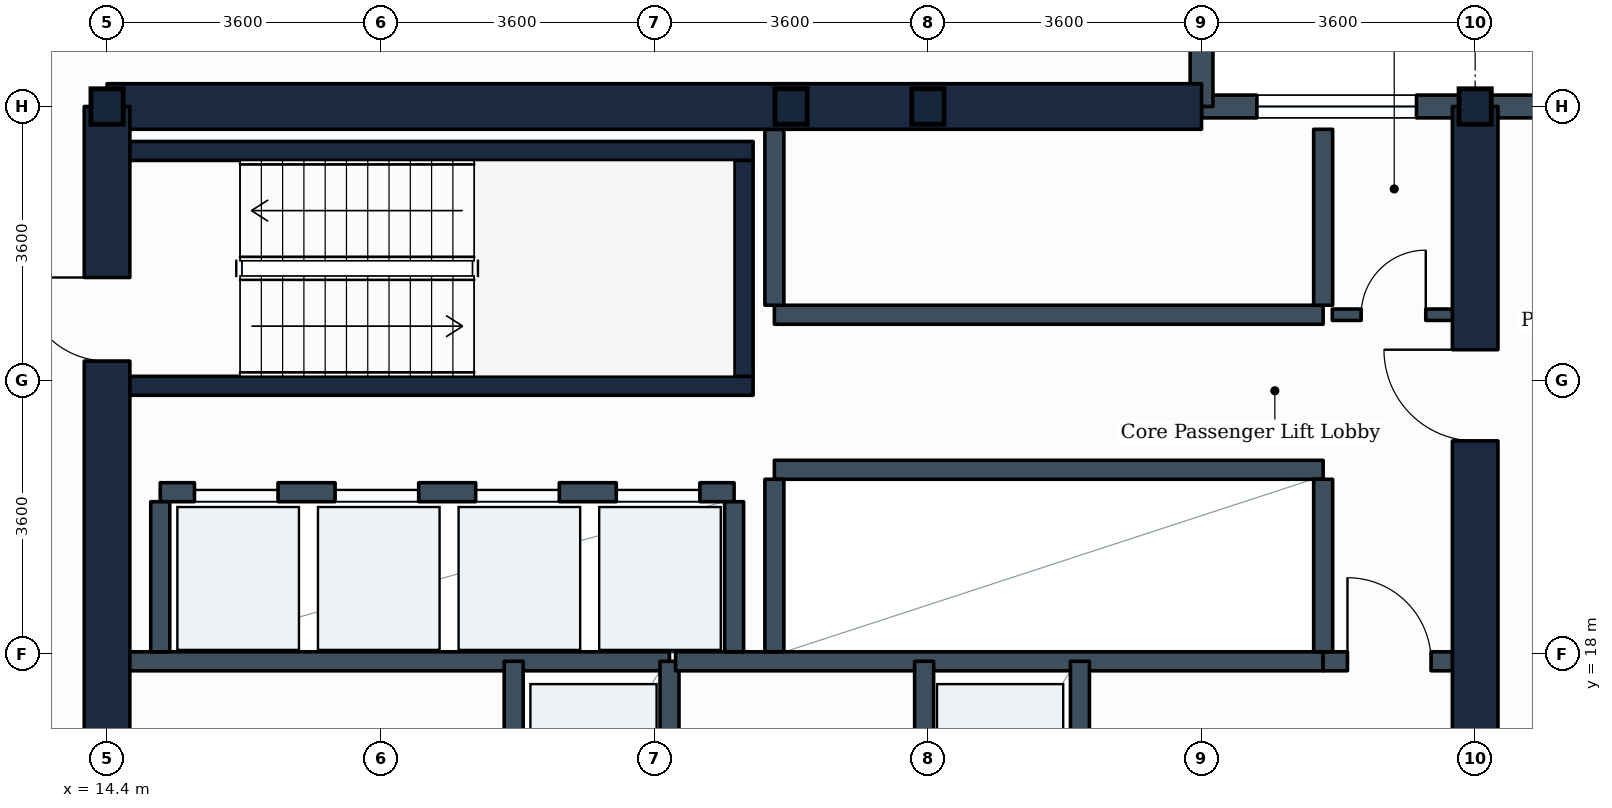
"""IFC4 building model, lengths in metres.
Left out: names, types, materials, properties, quantities, classifications, styles, units other than length and angle.
Written with IfcOpenShell. Run it as: python <this file> out.ifc"""

import sys

from ifc_helpers import new_model, si_unit, direction, frame, frame_2d, origin, origin_2d, place, context, subcontext, project, spatial, rectangle, i_section, extrude, element, fill, save


model = new_model("IFC4")
c1 = context("Model", 3, precision=1e-05, world=origin(), true_north=direction((0.0, 1.0)))
c2 = subcontext(c1, "Body", "Model", "MODEL_VIEW")
j1 = project(units=[si_unit("LENGTHUNIT", "METRE"), si_unit("PLANEANGLEUNIT", "RADIAN")], contexts=[c1])
p1 = place(None, origin())
s1 = spatial("IfcSite", under=j1, at=p1, CompositionType="ELEMENT")
p2 = place(p1, origin())
s2 = spatial("IfcBuilding", under=s1, at=p2, CompositionType="ELEMENT")
p3 = place(p2, frame((0.0, 0.0, 99.6)))
s3 = spatial("IfcBuildingStorey", under=s2, at=p3, CompositionType="ELEMENT", Elevation=99.6)
for number, where, z_axis, x_axis in (
    (1, (14.4, 25.2, 0.0), (0.0, 0.0, 1.0), (1.0, 0.0, 0.0)),
    (2, (23.4, 25.2, 0.0), (0.0, 0.0, 1.0), (1.0, 0.0, 0.0)),
    (3, (25.2, 25.2, 0.0), (0.0, 0.0, 1.0), (1.0, 0.0, 0.0)),
    (4, (32.4, 25.2, 0.0), (0.0, 0.0, 1.0), (1.0, 0.0, 0.0)),
):
    element("IfcColumn", number, at=place(p3, frame(where, z_axis=z_axis, x_axis=x_axis)), inside=s3, PredefinedType="COLUMN", context=c2, shape_type="SweptSolid", body=[
        extrude(i_section(OverallWidth=0.424, OverallDepth=0.467, WebThickness=0.033, FlangeThickness=0.053, FilletRadius=0.015, at=origin_2d()), origin(), (0.0, 0.0, 1.0), 3.9),
    ])
p4 = place(p3, frame((32.4, 25.2, 0.0), z_axis=(0.0, 0.0, 1.0), x_axis=(1.0, 0.0, 0.0)))
e5 = element("IfcWall", 5, at=p4, inside=s3, PredefinedType="STANDARD", context=c2, shape_type="SweptSolid", body=[
    extrude(rectangle(XDim=3.6, YDim=0.3, at=frame_2d((1.8, 0.0))), origin(), (0.0, 0.0, 1.0), 2.93),
])
p5 = place(p3, frame((28.8, 25.2, 0.0), z_axis=(0.0, 0.0, 1.0), x_axis=(1.0, 0.0, 0.0)))
e6 = element("IfcWall", 6, at=p5, inside=s3, PredefinedType="STANDARD", context=c2, shape_type="SweptSolid", body=[
    extrude(rectangle(XDim=3.6, YDim=0.3, at=frame_2d((1.8, 0.0))), origin(), (0.0, 0.0, 1.0), 3.635),
])
p6 = place(p5, frame((0.728, 0.0, 0.85)))
e7 = element("IfcOpeningElement", 7, at=p6, cuts=e6, PredefinedType="OPENING", context=c2, shape_type="SweptSolid", body=[
    extrude(rectangle(XDim=2.1, YDim=1.35, at=frame_2d((1.05, 0.675))), frame((0.0, 0.16, 0.0), z_axis=(0.0, -1.0, 0.0), x_axis=(1.0, 0.0, 0.0)), (0.0, 0.0, 1.0), 0.32),
])
p7 = place(p3, frame((28.8, 28.8, 0.0), z_axis=(0.0, 0.0, 1.0), x_axis=(0.0, -1.0, 0.0)))
e8 = element("IfcWall", 8, at=p7, inside=s3, PredefinedType="STANDARD", context=c2, shape_type="SweptSolid", body=[
    extrude(rectangle(XDim=3.6, YDim=0.3, at=frame_2d((1.8, 0.0))), origin(), (0.0, 0.0, 1.0), 3.19),
])
p8 = place(p3, frame((14.4, 25.2, 0.0), z_axis=(0.0, 0.0, 1.0), x_axis=(1.0, 0.0, 0.0)))
e9 = element("IfcWall", 9, at=p8, inside=s3, PredefinedType="SHEAR", context=c2, shape_type="SweptSolid", body=[
    extrude(rectangle(XDim=14.4, YDim=0.6, at=frame_2d((7.2, 0.0))), origin(), (0.0, 0.0, 1.0), 3.65),
])
p9 = place(p3, frame((14.4, 10.8, 0.0), z_axis=(0.0, 0.0, 1.0), x_axis=(0.0, 1.0, 0.0)))
e10 = element("IfcWall", 10, at=p9, inside=s3, PredefinedType="SHEAR", context=c2, shape_type="SweptSolid", body=[
    extrude(rectangle(XDim=14.4, YDim=0.6, at=frame_2d((7.2, 0.0))), origin(), (0.0, 0.0, 1.0), 3.65),
])
p10 = place(p9, frame((11.05, 0.0, 0.0)))
e11 = element("IfcOpeningElement", 11, at=p10, cuts=e10, PredefinedType="OPENING", context=c2, shape_type="SweptSolid", body=[
    extrude(rectangle(XDim=1.1, YDim=2.1, at=frame_2d((0.55, 1.05))), frame((0.0, 0.31, 0.0), z_axis=(0.0, -1.0, 0.0), x_axis=(1.0, 0.0, 0.0)), (0.0, 0.0, 1.0), 0.62),
])
p11 = place(p9, frame((4.9, 0.0, 0.0)))
e12 = element("IfcOpeningElement", 12, at=p11, cuts=e10, PredefinedType="OPENING", context=c2, shape_type="SweptSolid", body=[
    extrude(rectangle(XDim=1.2, YDim=2.1, at=frame_2d((0.6, 1.05))), frame((0.0, 0.31, 0.0), z_axis=(0.0, -1.0, 0.0), x_axis=(1.0, 0.0, 0.0)), (0.0, 0.0, 1.0), 0.62),
])
p12 = place(p3, frame((32.4, 10.8, 0.0), z_axis=(0.0, 0.0, 1.0), x_axis=(0.0, 1.0, 0.0)))
e13 = element("IfcWall", 13, at=p12, inside=s3, PredefinedType="SHEAR", context=c2, shape_type="SweptSolid", body=[
    extrude(rectangle(XDim=14.4, YDim=0.6, at=frame_2d((7.2, 0.0))), origin(), (0.0, 0.0, 1.0), 3.65),
])
p13 = place(p12, frame((4.35, 0.0, 0.0)))
e14 = element("IfcOpeningElement", 14, at=p13, cuts=e13, PredefinedType="OPENING", context=c2, shape_type="SweptSolid", body=[
    extrude(rectangle(XDim=1.2, YDim=2.1, at=frame_2d((0.6, 1.05))), frame((0.0, 0.31, 0.0), z_axis=(0.0, -1.0, 0.0), x_axis=(1.0, 0.0, 0.0)), (0.0, 0.0, 1.0), 0.62),
])
p14 = place(p12, frame((10.0, 0.0, 0.0)))
e15 = element("IfcOpeningElement", 15, at=p14, cuts=e13, PredefinedType="OPENING", context=c2, shape_type="SweptSolid", body=[
    extrude(rectangle(XDim=1.2, YDim=2.1, at=frame_2d((0.6, 1.05))), frame((0.0, 0.31, 0.0), z_axis=(0.0, -1.0, 0.0), x_axis=(1.0, 0.0, 0.0)), (0.0, 0.0, 1.0), 0.62),
])
for number, where, z_axis, x_axis in (
    (16, (14.7, 21.525, 0.0), (0.0, 0.0, 1.0), (1.0, 0.0, 0.0)),
    (17, (14.7, 24.615, 0.0), (0.0, 0.0, 1.0), (1.0, 0.0, 0.0)),
):
    element("IfcWall", number, at=place(p3, frame(where, z_axis=z_axis, x_axis=x_axis)), inside=s3, PredefinedType="SHEAR", context=c2, shape_type="SweptSolid", body=[
        extrude(rectangle(XDim=8.2, YDim=0.25, at=frame_2d((4.1, 0.0))), origin(), (0.0, 0.0, 1.0), 3.65),
    ])
p15 = place(p3, frame((22.775, 21.65, 0.0), z_axis=(0.0, 0.0, 1.0), x_axis=(0.0, 1.0, 0.0)))
e18 = element("IfcWall", 18, at=p15, inside=s3, PredefinedType="SHEAR", context=c2, shape_type="SweptSolid", body=[
    extrude(rectangle(XDim=2.84, YDim=0.25, at=frame_2d((1.42, 0.0))), origin(), (0.0, 0.0, 1.0), 3.65),
])
p16 = place(p3, frame((14.65, 17.9, 0.0), z_axis=(0.0, 0.0, 1.0), x_axis=(1.0, 0.0, 0.0)))
e19 = element("IfcWall", 19, at=p16, inside=s3, PredefinedType="PARTITIONING", context=c2, shape_type="SweptSolid", body=[
    extrude(rectangle(XDim=7.15, YDim=0.25, at=frame_2d((3.575, 0.0))), origin(), (0.0, 0.0, 1.0), 3.635),
])
p17 = place(p3, frame((19.75, 14.84, 0.0), z_axis=(0.0, 0.0, 1.0), x_axis=(0.0, 1.0, 0.0)))
e20 = element("IfcWall", 20, at=p17, inside=s3, PredefinedType="PARTITIONING", context=c2, shape_type="SweptSolid", body=[
    extrude(rectangle(XDim=3.06, YDim=0.25, at=frame_2d((1.53, 0.0))), origin(), (0.0, 0.0, 1.0), 3.635),
])
p18 = place(p17, frame((0.98, 0.0, 0.0)))
e21 = element("IfcOpeningElement", 21, at=p18, cuts=e20, PredefinedType="OPENING", context=c2, shape_type="SweptSolid", body=[
    extrude(rectangle(XDim=1.1, YDim=2.1, at=frame_2d((0.55, 1.05))), frame((0.0, 0.135, 0.0), z_axis=(0.0, -1.0, 0.0), x_axis=(1.0, 0.0, 0.0)), (0.0, 0.0, 1.0), 0.27),
])
p19 = place(p3, frame((21.8, 14.84, 0.0), z_axis=(0.0, 0.0, 1.0), x_axis=(0.0, 1.0, 0.0)))
e22 = element("IfcWall", 22, at=p19, inside=s3, PredefinedType="PARTITIONING", context=c2, shape_type="SweptSolid", body=[
    extrude(rectangle(XDim=3.06, YDim=0.25, at=frame_2d((1.53, 0.0))), origin(), (0.0, 0.0, 1.0), 3.635),
])
p20 = place(p3, frame((21.88, 17.9, 0.0), z_axis=(0.0, 0.0, 1.0), x_axis=(1.0, 0.0, 0.0)))
e23 = element("IfcWall", 23, at=p20, inside=s3, PredefinedType="PARTITIONING", context=c2, shape_type="SweptSolid", body=[
    extrude(rectangle(XDim=8.52, YDim=0.25, at=frame_2d((4.26, 0.0))), origin(), (0.0, 0.0, 1.0), 3.635),
])
p21 = place(p3, frame((30.4, 17.9, 0.0), z_axis=(0.0, 0.0, 1.0), x_axis=(1.0, 0.0, 0.0)))
e24 = element("IfcWall", 24, at=p21, inside=s3, PredefinedType="PARTITIONING", context=c2, shape_type="SweptSolid", body=[
    extrude(rectangle(XDim=1.75, YDim=0.25, at=frame_2d((0.875, 0.0))), origin(), (0.0, 0.0, 1.0), 3.635),
])
p22 = place(p21, frame((0.32, 0.0, 0.0)))
e25 = element("IfcOpeningElement", 25, at=p22, cuts=e24, PredefinedType="OPENING", context=c2, shape_type="SweptSolid", body=[
    extrude(rectangle(XDim=1.1, YDim=2.1, at=frame_2d((0.55, 1.05))), frame((0.0, 0.135, 0.0), z_axis=(0.0, -1.0, 0.0), x_axis=(1.0, 0.0, 0.0)), (0.0, 0.0, 1.0), 0.27),
])
p23 = place(p3, frame((25.15, 14.84, 0.0), z_axis=(0.0, 0.0, 1.0), x_axis=(0.0, 1.0, 0.0)))
e26 = element("IfcWall", 26, at=p23, inside=s3, PredefinedType="PARTITIONING", context=c2, shape_type="SweptSolid", body=[
    extrude(rectangle(XDim=3.06, YDim=0.25, at=frame_2d((1.53, 0.0))), origin(), (0.0, 0.0, 1.0), 3.635),
])
p24 = place(p3, frame((27.2, 14.84, 0.0), z_axis=(0.0, 0.0, 1.0), x_axis=(0.0, 1.0, 0.0)))
e27 = element("IfcWall", 27, at=p24, inside=s3, PredefinedType="PARTITIONING", context=c2, shape_type="SweptSolid", body=[
    extrude(rectangle(XDim=3.06, YDim=0.25, at=frame_2d((1.53, 0.0))), origin(), (0.0, 0.0, 1.0), 3.635),
])
p25 = place(p24, frame((0.98, 0.0, 0.0)))
e28 = element("IfcOpeningElement", 28, at=p25, cuts=e27, PredefinedType="OPENING", context=c2, shape_type="SweptSolid", body=[
    extrude(rectangle(XDim=1.1, YDim=2.1, at=frame_2d((0.55, 1.05))), frame((0.0, 0.135, 0.0), z_axis=(0.0, -1.0, 0.0), x_axis=(1.0, 0.0, 0.0)), (0.0, 0.0, 1.0), 0.27),
])
p26 = place(p3, frame((15.1, 20.125, 0.0), z_axis=(0.0, 0.0, 1.0), x_axis=(1.0, 0.0, 0.0)))
e29 = element("IfcWall", 29, at=p26, inside=s3, PredefinedType="PARTITIONING", context=c2, shape_type="SweptSolid", body=[
    extrude(rectangle(XDim=7.55, YDim=0.25, at=frame_2d((3.775, 0.0))), origin(), (0.0, 0.0, 1.0), 3.635),
])
p27 = place(p26, frame((0.45, 0.0, 0.0)))
e30 = element("IfcOpeningElement", 30, at=p27, cuts=e29, PredefinedType="OPENING", context=c2, shape_type="SweptSolid", body=[
    extrude(rectangle(XDim=1.1, YDim=2.1, at=frame_2d((0.55, 1.05))), frame((0.0, 0.135, 0.0), z_axis=(0.0, -1.0, 0.0), x_axis=(1.0, 0.0, 0.0)), (0.0, 0.0, 1.0), 0.27),
])
p28 = place(p26, frame((2.3, 0.0, 0.0)))
e31 = element("IfcOpeningElement", 31, at=p28, cuts=e29, PredefinedType="OPENING", context=c2, shape_type="SweptSolid", body=[
    extrude(rectangle(XDim=1.1, YDim=2.1, at=frame_2d((0.55, 1.05))), frame((0.0, 0.135, 0.0), z_axis=(0.0, -1.0, 0.0), x_axis=(1.0, 0.0, 0.0)), (0.0, 0.0, 1.0), 0.27),
])
p29 = place(p26, frame((4.15, 0.0, 0.0)))
e32 = element("IfcOpeningElement", 32, at=p29, cuts=e29, PredefinedType="OPENING", context=c2, shape_type="SweptSolid", body=[
    extrude(rectangle(XDim=1.1, YDim=2.1, at=frame_2d((0.55, 1.05))), frame((0.0, 0.135, 0.0), z_axis=(0.0, -1.0, 0.0), x_axis=(1.0, 0.0, 0.0)), (0.0, 0.0, 1.0), 0.27),
])
p30 = place(p26, frame((6.0, 0.0, 0.0)))
e33 = element("IfcOpeningElement", 33, at=p30, cuts=e29, PredefinedType="OPENING", context=c2, shape_type="SweptSolid", body=[
    extrude(rectangle(XDim=1.1, YDim=2.1, at=frame_2d((0.55, 1.05))), frame((0.0, 0.135, 0.0), z_axis=(0.0, -1.0, 0.0), x_axis=(1.0, 0.0, 0.0)), (0.0, 0.0, 1.0), 0.27),
])
for number, where, z_axis, x_axis in (
    (34, (15.1, 18.025, 0.0), (0.0, 0.0, 1.0), (0.0, 1.0, 0.0)),
    (35, (22.65, 18.025, 0.0), (0.0, 0.0, 1.0), (0.0, 1.0, 0.0)),
):
    element("IfcWall", number, at=place(p3, frame(where, z_axis=z_axis, x_axis=x_axis)), inside=s3, PredefinedType="PARTITIONING", context=c2, shape_type="SweptSolid", body=[
        extrude(rectangle(XDim=1.975, YDim=0.25, at=frame_2d((0.988, 0.0))), origin(), (0.0, 0.0, 1.0), 3.635),
    ])
p31 = place(p3, frame((23.18, 20.42, 0.0), z_axis=(0.0, 0.0, 1.0), x_axis=(1.0, 0.0, 0.0)))
e36 = element("IfcWall", 36, at=p31, inside=s3, PredefinedType="PARTITIONING", context=c2, shape_type="SweptSolid", body=[
    extrude(rectangle(XDim=7.22, YDim=0.25, at=frame_2d((3.61, 0.0))), origin(), (0.0, 0.0, 1.0), 3.635),
])
for number, where, z_axis, x_axis in (
    (37, (23.18, 18.025, 0.0), (0.0, 0.0, 1.0), (0.0, 1.0, 0.0)),
    (38, (30.4, 18.025, 0.0), (0.0, 0.0, 1.0), (0.0, 1.0, 0.0)),
):
    element("IfcWall", number, at=place(p3, frame(where, z_axis=z_axis, x_axis=x_axis)), inside=s3, PredefinedType="PARTITIONING", context=c2, shape_type="SweptSolid", body=[
        extrude(rectangle(XDim=2.27, YDim=0.25, at=frame_2d((1.135, 0.0))), origin(), (0.0, 0.0, 1.0), 3.635),
    ])
p32 = place(p3, frame((23.18, 22.46, 0.0), z_axis=(0.0, 0.0, 1.0), x_axis=(1.0, 0.0, 0.0)))
e39 = element("IfcWall", 39, at=p32, inside=s3, PredefinedType="PARTITIONING", context=c2, shape_type="SweptSolid", body=[
    extrude(rectangle(XDim=7.22, YDim=0.25, at=frame_2d((3.61, 0.0))), origin(), (0.0, 0.0, 1.0), 3.635),
])
for number, where, z_axis, x_axis in (
    (40, (23.18, 22.585, 0.0), (0.0, 0.0, 1.0), (0.0, 1.0, 0.0)),
    (41, (30.4, 22.585, 0.0), (0.0, 0.0, 1.0), (0.0, 1.0, 0.0)),
):
    element("IfcWall", number, at=place(p3, frame(where, z_axis=z_axis, x_axis=x_axis)), inside=s3, PredefinedType="PARTITIONING", context=c2, shape_type="SweptSolid", body=[
        extrude(rectangle(XDim=2.315, YDim=0.25, at=frame_2d((1.157, 0.0))), origin(), (0.0, 0.0, 1.0), 3.635),
    ])
p33 = place(p3, frame((30.52, 22.46, 0.0), z_axis=(0.0, 0.0, 1.0), x_axis=(1.0, 0.0, 0.0)))
e42 = element("IfcWall", 42, at=p33, inside=s3, PredefinedType="PARTITIONING", context=c2, shape_type="SweptSolid", body=[
    extrude(rectangle(XDim=1.63, YDim=0.15, at=frame_2d((0.815, 0.0))), origin(), (0.0, 0.0, 1.0), 3.635),
])
p34 = place(p33, frame((0.38, 0.0, 0.0)))
e43 = element("IfcOpeningElement", 43, at=p34, cuts=e42, PredefinedType="OPENING", context=c2, shape_type="SweptSolid", body=[
    extrude(rectangle(XDim=0.85, YDim=2.1, at=frame_2d((0.425, 1.05))), frame((0.0, 0.085, 0.0), z_axis=(0.0, -1.0, 0.0), x_axis=(1.0, 0.0, 0.0)), (0.0, 0.0, 1.0), 0.17),
])
p35 = place(p6, origin())
e44 = element("IfcWindow", 44, at=p35, inside=s3, PartitioningType="SINGLE_PANEL", PredefinedType="WINDOW", context=c2, shape_type="SweptSolid", body=[
    extrude(rectangle(XDim=2.1, YDim=1.35, at=frame_2d((1.05, 0.675))), frame((0.0, 0.03, 0.0), z_axis=(0.0, -1.0, 0.0), x_axis=(1.0, 0.0, 0.0)), (0.0, 0.0, 1.0), 0.06),
])
fill(e7, e44)
p36 = place(p10, origin())
e45 = element("IfcDoor", 45, at=p36, inside=s3, OperationType="SINGLE_SWING_RIGHT", PredefinedType="DOOR", context=c2, shape_type="SweptSolid", body=[
    extrude(rectangle(XDim=1.1, YDim=2.1, at=frame_2d((0.55, 1.05))), frame((0.0, 0.025, 0.0), z_axis=(0.0, -1.0, 0.0), x_axis=(1.0, 0.0, 0.0)), (0.0, 0.0, 1.0), 0.05),
])
fill(e11, e45)
p37 = place(p22, origin())
e46 = element("IfcDoor", 46, at=p37, inside=s3, OperationType="SINGLE_SWING_LEFT", PredefinedType="DOOR", context=c2, shape_type="SweptSolid", body=[
    extrude(rectangle(XDim=1.1, YDim=2.1, at=frame_2d((0.55, 1.05))), frame((0.0, 0.025, 0.0), z_axis=(0.0, -1.0, 0.0), x_axis=(1.0, 0.0, 0.0)), (0.0, 0.0, 1.0), 0.05),
])
fill(e25, e46)
p38 = place(p27, origin())
e47 = element("IfcDoor", 47, at=p38, inside=s3, OperationType="SLIDING_TO_LEFT", PredefinedType="DOOR", context=c2, shape_type="SweptSolid", body=[
    extrude(rectangle(XDim=1.1, YDim=2.1, at=frame_2d((0.55, 1.05))), frame((0.0, 0.025, 0.0), z_axis=(0.0, -1.0, 0.0), x_axis=(1.0, 0.0, 0.0)), (0.0, 0.0, 1.0), 0.05),
])
fill(e30, e47)
p39 = place(p28, origin())
e48 = element("IfcDoor", 48, at=p39, inside=s3, OperationType="SLIDING_TO_LEFT", PredefinedType="DOOR", context=c2, shape_type="SweptSolid", body=[
    extrude(rectangle(XDim=1.1, YDim=2.1, at=frame_2d((0.55, 1.05))), frame((0.0, 0.025, 0.0), z_axis=(0.0, -1.0, 0.0), x_axis=(1.0, 0.0, 0.0)), (0.0, 0.0, 1.0), 0.05),
])
fill(e31, e48)
p40 = place(p29, origin())
e49 = element("IfcDoor", 49, at=p40, inside=s3, OperationType="SLIDING_TO_LEFT", PredefinedType="DOOR", context=c2, shape_type="SweptSolid", body=[
    extrude(rectangle(XDim=1.1, YDim=2.1, at=frame_2d((0.55, 1.05))), frame((0.0, 0.025, 0.0), z_axis=(0.0, -1.0, 0.0), x_axis=(1.0, 0.0, 0.0)), (0.0, 0.0, 1.0), 0.05),
])
fill(e32, e49)
p41 = place(p30, origin())
e50 = element("IfcDoor", 50, at=p41, inside=s3, OperationType="SLIDING_TO_LEFT", PredefinedType="DOOR", context=c2, shape_type="SweptSolid", body=[
    extrude(rectangle(XDim=1.1, YDim=2.1, at=frame_2d((0.55, 1.05))), frame((0.0, 0.025, 0.0), z_axis=(0.0, -1.0, 0.0), x_axis=(1.0, 0.0, 0.0)), (0.0, 0.0, 1.0), 0.05),
])
fill(e33, e50)
p42 = place(p14, origin())
e51 = element("IfcDoor", 51, at=p42, inside=s3, OperationType="SINGLE_SWING_RIGHT", PredefinedType="DOOR", context=c2, shape_type="SweptSolid", body=[
    extrude(rectangle(XDim=1.2, YDim=2.1, at=frame_2d((0.6, 1.05))), frame((0.0, 0.025, 0.0), z_axis=(0.0, -1.0, 0.0), x_axis=(1.0, 0.0, 0.0)), (0.0, 0.0, 1.0), 0.05),
])
fill(e15, e51)
p43 = place(p34, origin())
e52 = element("IfcDoor", 52, at=p43, inside=s3, OperationType="SINGLE_SWING_RIGHT", PredefinedType="DOOR", context=c2, shape_type="SweptSolid", body=[
    extrude(rectangle(XDim=0.85, YDim=2.1, at=frame_2d((0.425, 1.05))), frame((0.0, 0.025, 0.0), z_axis=(0.0, -1.0, 0.0), x_axis=(1.0, 0.0, 0.0)), (0.0, 0.0, 1.0), 0.05),
])
fill(e43, e52)
save(model, sys.argv[1])
